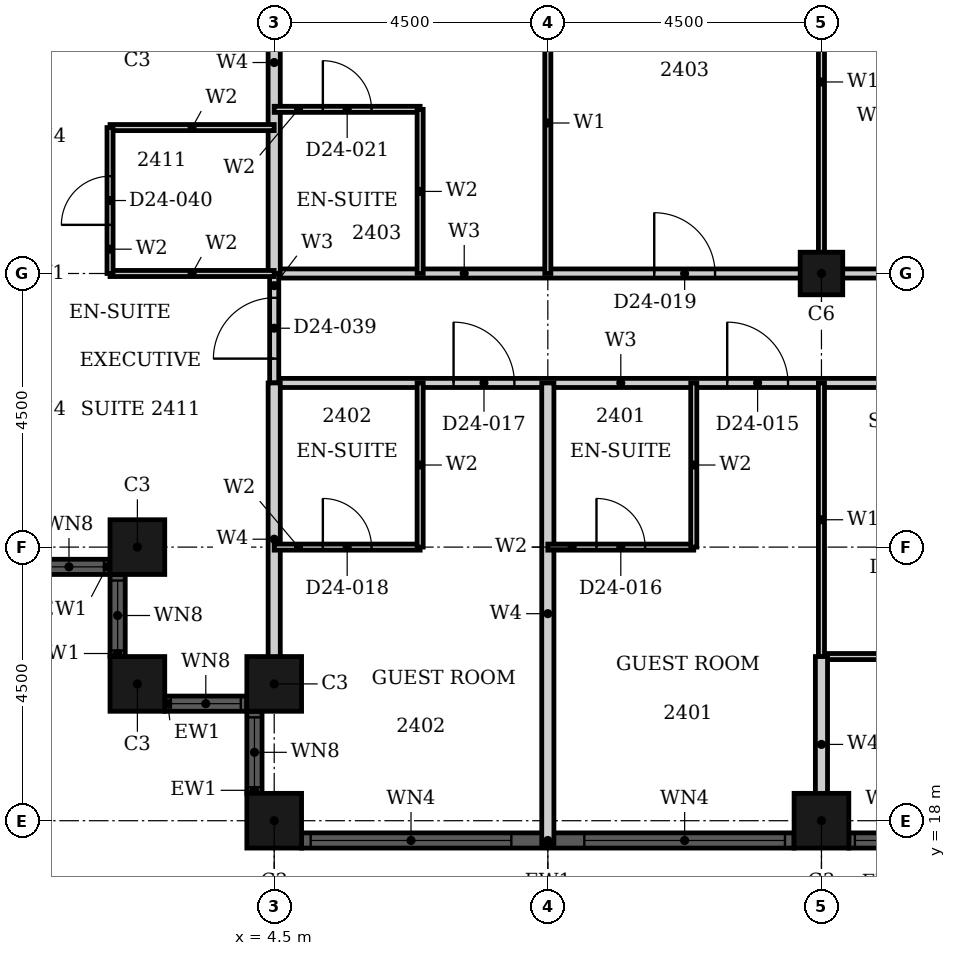
"""IFC4 building model, lengths in metres.
Left out: names, types, materials, properties, quantities, classifications, styles, units other than length and angle.
Written with IfcOpenShell. Run it as: python <this file> out.ifc"""

import sys

from ifc_helpers import new_model, si_unit, direction, frame, frame_2d, origin, origin_2d, place, context, subcontext, project, spatial, rectangle, hollow_rectangle, extrude, element, fill, save


model = new_model("IFC4")
c1 = context("Model", 3, precision=1e-05, world=origin(), true_north=direction((0.0, 1.0)))
c2 = subcontext(c1, "Body", "Model", "MODEL_VIEW")
j1 = project(units=[si_unit("LENGTHUNIT", "METRE"), si_unit("PLANEANGLEUNIT", "RADIAN")], contexts=[c1])
p1 = place(None, origin())
s1 = spatial("IfcSite", under=j1, at=p1, CompositionType="ELEMENT")
p2 = place(p1, origin())
s2 = spatial("IfcBuilding", under=s1, at=p2, CompositionType="ELEMENT")
p3 = place(p2, frame((0.0, 0.0, 100.8)))
s3 = spatial("IfcBuildingStorey", under=s2, at=p3, CompositionType="ELEMENT", Elevation=100.8)
for number, where, z_axis, x_axis in (
    (1, (2.25, 22.5, 0.0), (0.0, 0.0, 1.0), (1.0, 0.0, 0.0)),
    (2, (2.25, 20.25, 0.0), (0.0, 0.0, 1.0), (1.0, 0.0, 0.0)),
    (3, (4.5, 20.25, 0.0), (0.0, 0.0, 1.0), (1.0, 0.0, 0.0)),
    (4, (4.5, 18.0, 0.0), (0.0, 0.0, 1.0), (1.0, 0.0, 0.0)),
    (5, (13.5, 18.0, 0.0), (0.0, 0.0, 1.0), (1.0, 0.0, 0.0)),
):
    element("IfcColumn", number, at=place(p3, frame(where, z_axis=z_axis, x_axis=x_axis)), inside=s3, PredefinedType="COLUMN", context=c2, shape_type="SweptSolid", body=[
        extrude(hollow_rectangle(XDim=0.9, YDim=0.9, WallThickness=0.028, at=origin_2d()), origin(), (0.0, 0.0, 1.0), 3.6),
    ])
p4 = place(p3, frame((13.5, 27.0, 0.0), z_axis=(0.0, 0.0, 1.0), x_axis=(1.0, 0.0, 0.0)))
e6 = element("IfcColumn", 6, at=p4, inside=s3, PredefinedType="COLUMN", context=c2, shape_type="SweptSolid", body=[
    extrude(hollow_rectangle(XDim=0.7, YDim=0.7, WallThickness=0.022, at=origin_2d()), origin(), (0.0, 0.0, 1.0), 3.6),
])
p5 = place(p3, frame((0.45, 22.175, 0.0), z_axis=(0.0, 0.0, 1.0), x_axis=(1.0, 0.0, 0.0)))
e7 = element("IfcWall", 7, at=p5, inside=s3, PredefinedType="SOLIDWALL", context=c2, shape_type="SweptSolid", body=[
    extrude(rectangle(XDim=1.35, YDim=0.25, at=frame_2d((0.675, 0.0))), origin(), (0.0, 0.0, 1.0), 3.6),
])
p6 = place(p5, frame((0.1, 0.0, 0.9)))
e8 = element("IfcOpeningElement", 8, at=p6, cuts=e7, PredefinedType="OPENING", context=c2, shape_type="SweptSolid", body=[
    extrude(rectangle(XDim=1.15, YDim=2.08, at=frame_2d((0.575, 1.04))), frame((0.0, 0.135, 0.0), z_axis=(0.0, -1.0, 0.0), x_axis=(1.0, 0.0, 0.0)), (0.0, 0.0, 1.0), 0.27),
])
p7 = place(p3, frame((1.925, 22.05, 0.0), z_axis=(0.0, 0.0, 1.0), x_axis=(0.0, -1.0, 0.0)))
e9 = element("IfcWall", 9, at=p7, inside=s3, PredefinedType="SOLIDWALL", context=c2, shape_type="SweptSolid", body=[
    extrude(rectangle(XDim=1.35, YDim=0.25, at=frame_2d((0.675, 0.0))), origin(), (0.0, 0.0, 1.0), 3.6),
])
p8 = place(p7, frame((0.1, 0.0, 0.9)))
e10 = element("IfcOpeningElement", 10, at=p8, cuts=e9, PredefinedType="OPENING", context=c2, shape_type="SweptSolid", body=[
    extrude(rectangle(XDim=1.15, YDim=2.08, at=frame_2d((0.575, 1.04))), frame((0.0, 0.135, 0.0), z_axis=(0.0, -1.0, 0.0), x_axis=(1.0, 0.0, 0.0)), (0.0, 0.0, 1.0), 0.27),
])
p9 = place(p3, frame((2.7, 19.925, 0.0), z_axis=(0.0, 0.0, 1.0), x_axis=(1.0, 0.0, 0.0)))
e11 = element("IfcWall", 11, at=p9, inside=s3, PredefinedType="SOLIDWALL", context=c2, shape_type="SweptSolid", body=[
    extrude(rectangle(XDim=1.35, YDim=0.25, at=frame_2d((0.675, 0.0))), origin(), (0.0, 0.0, 1.0), 3.6),
])
p10 = place(p9, frame((0.1, 0.0, 0.9)))
e12 = element("IfcOpeningElement", 12, at=p10, cuts=e11, PredefinedType="OPENING", context=c2, shape_type="SweptSolid", body=[
    extrude(rectangle(XDim=1.15, YDim=2.08, at=frame_2d((0.575, 1.04))), frame((0.0, 0.135, 0.0), z_axis=(0.0, -1.0, 0.0), x_axis=(1.0, 0.0, 0.0)), (0.0, 0.0, 1.0), 0.27),
])
p11 = place(p3, frame((4.175, 19.8, 0.0), z_axis=(0.0, 0.0, 1.0), x_axis=(0.0, -1.0, 0.0)))
e13 = element("IfcWall", 13, at=p11, inside=s3, PredefinedType="SOLIDWALL", context=c2, shape_type="SweptSolid", body=[
    extrude(rectangle(XDim=1.35, YDim=0.25, at=frame_2d((0.675, 0.0))), origin(), (0.0, 0.0, 1.0), 3.6),
])
p12 = place(p11, frame((0.1, 0.0, 0.9)))
e14 = element("IfcOpeningElement", 14, at=p12, cuts=e13, PredefinedType="OPENING", context=c2, shape_type="SweptSolid", body=[
    extrude(rectangle(XDim=1.15, YDim=2.08, at=frame_2d((0.575, 1.04))), frame((0.0, 0.135, 0.0), z_axis=(0.0, -1.0, 0.0), x_axis=(1.0, 0.0, 0.0)), (0.0, 0.0, 1.0), 0.27),
])
p13 = place(p3, frame((4.95, 17.675, 0.0), z_axis=(0.0, 0.0, 1.0), x_axis=(1.0, 0.0, 0.0)))
e15 = element("IfcWall", 15, at=p13, inside=s3, PredefinedType="SOLIDWALL", context=c2, shape_type="SweptSolid", body=[
    extrude(rectangle(XDim=8.1, YDim=0.25, at=frame_2d((4.05, 0.0))), origin(), (0.0, 0.0, 1.0), 3.6),
])
p14 = place(p13, frame((0.15, 0.0, 0.9)))
e16 = element("IfcOpeningElement", 16, at=p14, cuts=e15, PredefinedType="OPENING", context=c2, shape_type="SweptSolid", body=[
    extrude(rectangle(XDim=3.3, YDim=2.08, at=frame_2d((1.65, 1.04))), frame((0.0, 0.135, 0.0), z_axis=(0.0, -1.0, 0.0), x_axis=(1.0, 0.0, 0.0)), (0.0, 0.0, 1.0), 0.27),
])
p15 = place(p13, frame((4.65, 0.0, 0.9)))
e17 = element("IfcOpeningElement", 17, at=p15, cuts=e15, PredefinedType="OPENING", context=c2, shape_type="SweptSolid", body=[
    extrude(rectangle(XDim=3.3, YDim=2.08, at=frame_2d((1.65, 1.04))), frame((0.0, 0.135, 0.0), z_axis=(0.0, -1.0, 0.0), x_axis=(1.0, 0.0, 0.0)), (0.0, 0.0, 1.0), 0.27),
])
p16 = place(p3, frame((13.95, 17.675, 0.0), z_axis=(0.0, 0.0, 1.0), x_axis=(1.0, 0.0, 0.0)))
e18 = element("IfcWall", 18, at=p16, inside=s3, PredefinedType="SOLIDWALL", context=c2, shape_type="SweptSolid", body=[
    extrude(rectangle(XDim=1.35, YDim=0.25, at=frame_2d((0.675, 0.0))), origin(), (0.0, 0.0, 1.0), 3.6),
])
p17 = place(p16, frame((0.1, 0.0, 0.9)))
e19 = element("IfcOpeningElement", 19, at=p17, cuts=e18, PredefinedType="OPENING", context=c2, shape_type="SweptSolid", body=[
    extrude(rectangle(XDim=1.15, YDim=2.08, at=frame_2d((0.575, 1.04))), frame((0.0, 0.135, 0.0), z_axis=(0.0, -1.0, 0.0), x_axis=(1.0, 0.0, 0.0)), (0.0, 0.0, 1.0), 0.27),
])
p18 = place(p3, frame((4.5, 25.2, 0.0), z_axis=(0.0, 0.0, 1.0), x_axis=(1.0, 0.0, 0.0)))
e20 = element("IfcWall", 20, at=p18, inside=s3, PredefinedType="PARTITIONING", context=c2, shape_type="SweptSolid", body=[
    extrude(rectangle(XDim=11.7, YDim=0.15, at=frame_2d((5.85, 0.0))), origin(), (0.0, 0.0, 1.0), 3.3),
])
p19 = place(p18, frame((7.45, 0.0, 0.0)))
e21 = element("IfcOpeningElement", 21, at=p19, cuts=e20, PredefinedType="OPENING", context=c2, shape_type="SweptSolid", body=[
    extrude(rectangle(XDim=1.0, YDim=2.1, at=frame_2d((0.5, 1.05))), frame((0.0, 0.085, 0.0), z_axis=(0.0, -1.0, 0.0), x_axis=(1.0, 0.0, 0.0)), (0.0, 0.0, 1.0), 0.17),
])
p20 = place(p18, frame((2.95, 0.0, 0.0)))
e22 = element("IfcOpeningElement", 22, at=p20, cuts=e20, PredefinedType="OPENING", context=c2, shape_type="SweptSolid", body=[
    extrude(rectangle(XDim=1.0, YDim=2.1, at=frame_2d((0.5, 1.05))), frame((0.0, 0.085, 0.0), z_axis=(0.0, -1.0, 0.0), x_axis=(1.0, 0.0, 0.0)), (0.0, 0.0, 1.0), 0.17),
])
p21 = place(p3, frame((4.5, 27.0, 0.0), z_axis=(0.0, 0.0, 1.0), x_axis=(1.0, 0.0, 0.0)))
e23 = element("IfcWall", 23, at=p21, inside=s3, PredefinedType="PARTITIONING", context=c2, shape_type="SweptSolid", body=[
    extrude(rectangle(XDim=11.7, YDim=0.15, at=frame_2d((5.85, 0.0))), origin(), (0.0, 0.0, 1.0), 2.58),
])
p22 = place(p21, frame((6.25, 0.0, 0.0)))
e24 = element("IfcOpeningElement", 24, at=p22, cuts=e23, PredefinedType="OPENING", context=c2, shape_type="SweptSolid", body=[
    extrude(rectangle(XDim=1.0, YDim=2.1, at=frame_2d((0.5, 1.05))), frame((0.0, 0.085, 0.0), z_axis=(0.0, -1.0, 0.0), x_axis=(1.0, 0.0, 0.0)), (0.0, 0.0, 1.0), 0.17),
])
p23 = place(p3, frame((4.5, 25.2, 0.0), z_axis=(0.0, 0.0, 1.0), x_axis=(0.0, 1.0, 0.0)))
e25 = element("IfcWall", 25, at=p23, inside=s3, PredefinedType="PARTITIONING", context=c2, shape_type="SweptSolid", body=[
    extrude(rectangle(XDim=1.8, YDim=0.15, at=frame_2d((0.9, 0.0))), origin(), (0.0, 0.0, 1.0), 3.3),
])
p24 = place(p23, frame((0.4, 0.0, 0.0)))
e26 = element("IfcOpeningElement", 26, at=p24, cuts=e25, PredefinedType="OPENING", context=c2, shape_type="SweptSolid", body=[
    extrude(rectangle(XDim=1.0, YDim=2.1, at=frame_2d((0.5, 1.05))), frame((0.0, 0.085, 0.0), z_axis=(0.0, -1.0, 0.0), x_axis=(1.0, 0.0, 0.0)), (0.0, 0.0, 1.0), 0.17),
])
p25 = place(p3, frame((13.5, 20.7, 0.0), z_axis=(0.0, 0.0, 1.0), x_axis=(1.0, 0.0, 0.0)))
e27 = element("IfcWall", 27, at=p25, inside=s3, PredefinedType="PARTITIONING", context=c2, shape_type="SweptSolid", body=[
    extrude(rectangle(XDim=2.7, YDim=0.1, at=frame_2d((1.35, 0.0))), origin(), (0.0, 0.0, 1.0), 3.3),
])
p26 = place(p3, frame((13.5, 20.7, 0.0), z_axis=(0.0, 0.0, 1.0), x_axis=(0.0, 1.0, 0.0)))
e28 = element("IfcWall", 28, at=p26, inside=s3, PredefinedType="PARTITIONING", context=c2, shape_type="SweptSolid", body=[
    extrude(rectangle(XDim=4.5, YDim=0.1, at=frame_2d((2.25, 0.0))), origin(), (0.0, 0.0, 1.0), 2.38),
])
p27 = place(p3, frame((13.5, 27.0, 0.0), z_axis=(0.0, 0.0, 1.0), x_axis=(0.0, 1.0, 0.0)))
e29 = element("IfcWall", 29, at=p27, inside=s3, PredefinedType="PARTITIONING", context=c2, shape_type="SweptSolid", body=[
    extrude(rectangle(XDim=6.3, YDim=0.1, at=frame_2d((3.15, 0.0))), origin(), (0.0, 0.0, 1.0), 2.38),
])
p28 = place(p3, frame((9.0, 27.0, 0.0), z_axis=(0.0, 0.0, 1.0), x_axis=(0.0, 1.0, 0.0)))
e30 = element("IfcWall", 30, at=p28, inside=s3, PredefinedType="PARTITIONING", context=c2, shape_type="SweptSolid", body=[
    extrude(rectangle(XDim=9.39, YDim=0.1, at=frame_2d((4.695, 0.0))), origin(), (0.0, 0.0, 1.0), 3.3),
])
p29 = place(p28, frame((4.95, 0.0, 0.0)))
e31 = element("IfcOpeningElement", 31, at=p29, cuts=e30, PredefinedType="OPENING", context=c2, shape_type="SweptSolid", body=[
    extrude(rectangle(XDim=0.9, YDim=2.1, at=frame_2d((0.45, 1.05))), frame((0.0, 0.06, 0.0), z_axis=(0.0, -1.0, 0.0), x_axis=(1.0, 0.0, 0.0)), (0.0, 0.0, 1.0), 0.12),
])
p30 = place(p3, frame((13.5, 17.81, 0.0), z_axis=(0.0, 0.0, 1.0), x_axis=(0.0, 1.0, 0.0)))
e32 = element("IfcWall", 32, at=p30, inside=s3, PredefinedType="PARTITIONING", context=c2, shape_type="SweptSolid", body=[
    extrude(rectangle(XDim=2.89, YDim=0.2, at=frame_2d((1.445, 0.0))), origin(), (0.0, 0.0, 1.0), 2.38),
])
p31 = place(p3, frame((4.5, 20.06, 0.0), z_axis=(0.0, 0.0, 1.0), x_axis=(0.0, 1.0, 0.0)))
e33 = element("IfcWall", 33, at=p31, inside=s3, PredefinedType="PARTITIONING", context=c2, shape_type="SweptSolid", body=[
    extrude(rectangle(XDim=5.14, YDim=0.2, at=frame_2d((2.57, 0.0))), origin(), (0.0, 0.0, 1.0), 3.3),
])
p32 = place(p3, frame((4.5, 27.0, 0.0), z_axis=(0.0, 0.0, 1.0), x_axis=(0.0, 1.0, 0.0)))
e34 = element("IfcWall", 34, at=p32, inside=s3, PredefinedType="PARTITIONING", context=c2, shape_type="SweptSolid", body=[
    extrude(rectangle(XDim=6.94, YDim=0.2, at=frame_2d((3.47, 0.0))), origin(), (0.0, 0.0, 1.0), 3.3),
])
p33 = place(p3, frame((9.0, 17.61, 0.0), z_axis=(0.0, 0.0, 1.0), x_axis=(0.0, 1.0, 0.0)))
e35 = element("IfcWall", 35, at=p33, inside=s3, PredefinedType="PARTITIONING", context=c2, shape_type="SweptSolid", body=[
    extrude(rectangle(XDim=7.59, YDim=0.2, at=frame_2d((3.795, 0.0))), origin(), (0.0, 0.0, 1.0), 3.3),
])
p34 = place(p3, frame((9.0, 22.5, 0.0), z_axis=(0.0, 0.0, 1.0), x_axis=(1.0, 0.0, 0.0)))
e36 = element("IfcWall", 36, at=p34, inside=s3, PredefinedType="PARTITIONING", context=c2, shape_type="SweptSolid", body=[
    extrude(rectangle(XDim=2.4, YDim=0.1, at=frame_2d((1.2, 0.0))), origin(), (0.0, 0.0, 1.0), 2.58),
])
p35 = place(p34, frame((0.8, 0.0, 0.0)))
e37 = element("IfcOpeningElement", 37, at=p35, cuts=e36, PredefinedType="OPENING", context=c2, shape_type="SweptSolid", body=[
    extrude(rectangle(XDim=0.8, YDim=2.1, at=frame_2d((0.4, 1.05))), frame((0.0, 0.06, 0.0), z_axis=(0.0, -1.0, 0.0), x_axis=(1.0, 0.0, 0.0)), (0.0, 0.0, 1.0), 0.12),
])
p36 = place(p3, frame((4.5, 22.5, 0.0), z_axis=(0.0, 0.0, 1.0), x_axis=(1.0, 0.0, 0.0)))
e38 = element("IfcWall", 38, at=p36, inside=s3, PredefinedType="PARTITIONING", context=c2, shape_type="SweptSolid", body=[
    extrude(rectangle(XDim=2.4, YDim=0.1, at=frame_2d((1.2, 0.0))), origin(), (0.0, 0.0, 1.0), 2.58),
])
p37 = place(p36, frame((0.8, 0.0, 0.0)))
e39 = element("IfcOpeningElement", 39, at=p37, cuts=e38, PredefinedType="OPENING", context=c2, shape_type="SweptSolid", body=[
    extrude(rectangle(XDim=0.8, YDim=2.1, at=frame_2d((0.4, 1.05))), frame((0.0, 0.06, 0.0), z_axis=(0.0, -1.0, 0.0), x_axis=(1.0, 0.0, 0.0)), (0.0, 0.0, 1.0), 0.12),
])
p38 = place(p3, frame((1.8, 27.0, 0.0), z_axis=(0.0, 0.0, 1.0), x_axis=(1.0, 0.0, 0.0)))
e40 = element("IfcWall", 40, at=p38, inside=s3, PredefinedType="PARTITIONING", context=c2, shape_type="SweptSolid", body=[
    extrude(rectangle(XDim=2.7, YDim=0.1, at=frame_2d((1.35, 0.0))), origin(), (0.0, 0.0, 1.0), 2.58),
])
p39 = place(p3, frame((1.8, 29.4, 0.0), z_axis=(0.0, 0.0, 1.0), x_axis=(1.0, 0.0, 0.0)))
e41 = element("IfcWall", 41, at=p39, inside=s3, PredefinedType="PARTITIONING", context=c2, shape_type="SweptSolid", body=[
    extrude(rectangle(XDim=2.7, YDim=0.1, at=frame_2d((1.35, 0.0))), origin(), (0.0, 0.0, 1.0), 3.3),
])
p40 = place(p3, frame((4.5, 29.7, 0.0), z_axis=(0.0, 0.0, 1.0), x_axis=(1.0, 0.0, 0.0)))
e42 = element("IfcWall", 42, at=p40, inside=s3, PredefinedType="PARTITIONING", context=c2, shape_type="SweptSolid", body=[
    extrude(rectangle(XDim=2.4, YDim=0.1, at=frame_2d((1.2, 0.0))), origin(), (0.0, 0.0, 1.0), 3.3),
])
p41 = place(p40, frame((0.8, 0.0, 0.0)))
e43 = element("IfcOpeningElement", 43, at=p41, cuts=e42, PredefinedType="OPENING", context=c2, shape_type="SweptSolid", body=[
    extrude(rectangle(XDim=0.8, YDim=2.1, at=frame_2d((0.4, 1.05))), frame((0.0, 0.06, 0.0), z_axis=(0.0, -1.0, 0.0), x_axis=(1.0, 0.0, 0.0)), (0.0, 0.0, 1.0), 0.12),
])
p42 = place(p3, frame((1.8, 27.0, 0.0), z_axis=(0.0, 0.0, 1.0), x_axis=(0.0, 1.0, 0.0)))
e44 = element("IfcWall", 44, at=p42, inside=s3, PredefinedType="PARTITIONING", context=c2, shape_type="SweptSolid", body=[
    extrude(rectangle(XDim=2.4, YDim=0.1, at=frame_2d((1.2, 0.0))), origin(), (0.0, 0.0, 1.0), 3.3),
])
p43 = place(p42, frame((0.8, 0.0, 0.0)))
e45 = element("IfcOpeningElement", 45, at=p43, cuts=e44, PredefinedType="OPENING", context=c2, shape_type="SweptSolid", body=[
    extrude(rectangle(XDim=0.8, YDim=2.1, at=frame_2d((0.4, 1.05))), frame((0.0, 0.06, 0.0), z_axis=(0.0, -1.0, 0.0), x_axis=(1.0, 0.0, 0.0)), (0.0, 0.0, 1.0), 0.12),
])
for number, where, z_axis, x_axis in (
    (46, (11.4, 22.5, 0.0), (0.0, 0.0, 1.0), (0.0, 1.0, 0.0)),
    (47, (6.9, 22.5, 0.0), (0.0, 0.0, 1.0), (0.0, 1.0, 0.0)),
    (48, (6.9, 27.0, 0.0), (0.0, 0.0, 1.0), (0.0, 1.0, 0.0)),
):
    element("IfcWall", number, at=place(p3, frame(where, z_axis=z_axis, x_axis=x_axis)), inside=s3, PredefinedType="PARTITIONING", context=c2, shape_type="SweptSolid", body=[
        extrude(rectangle(XDim=2.7, YDim=0.1, at=frame_2d((1.35, 0.0))), origin(), (0.0, 0.0, 1.0), 3.3),
    ])
p44 = place(p6, origin())
e49 = element("IfcWindow", 49, at=p44, inside=s3, PartitioningType="SINGLE_PANEL", PredefinedType="WINDOW", context=c2, shape_type="SweptSolid", body=[
    extrude(rectangle(XDim=1.15, YDim=2.08, at=frame_2d((0.575, 1.04))), frame((0.0, 0.03, 0.0), z_axis=(0.0, -1.0, 0.0), x_axis=(1.0, 0.0, 0.0)), (0.0, 0.0, 1.0), 0.06),
])
fill(e8, e49)
p45 = place(p8, origin())
e50 = element("IfcWindow", 50, at=p45, inside=s3, PartitioningType="SINGLE_PANEL", PredefinedType="WINDOW", context=c2, shape_type="SweptSolid", body=[
    extrude(rectangle(XDim=1.15, YDim=2.08, at=frame_2d((0.575, 1.04))), frame((0.0, 0.03, 0.0), z_axis=(0.0, -1.0, 0.0), x_axis=(1.0, 0.0, 0.0)), (0.0, 0.0, 1.0), 0.06),
])
fill(e10, e50)
p46 = place(p10, origin())
e51 = element("IfcWindow", 51, at=p46, inside=s3, PartitioningType="SINGLE_PANEL", PredefinedType="WINDOW", context=c2, shape_type="SweptSolid", body=[
    extrude(rectangle(XDim=1.15, YDim=2.08, at=frame_2d((0.575, 1.04))), frame((0.0, 0.03, 0.0), z_axis=(0.0, -1.0, 0.0), x_axis=(1.0, 0.0, 0.0)), (0.0, 0.0, 1.0), 0.06),
])
fill(e12, e51)
p47 = place(p12, origin())
e52 = element("IfcWindow", 52, at=p47, inside=s3, PartitioningType="SINGLE_PANEL", PredefinedType="WINDOW", context=c2, shape_type="SweptSolid", body=[
    extrude(rectangle(XDim=1.15, YDim=2.08, at=frame_2d((0.575, 1.04))), frame((0.0, 0.03, 0.0), z_axis=(0.0, -1.0, 0.0), x_axis=(1.0, 0.0, 0.0)), (0.0, 0.0, 1.0), 0.06),
])
fill(e14, e52)
p48 = place(p14, origin())
e53 = element("IfcWindow", 53, at=p48, inside=s3, PartitioningType="SINGLE_PANEL", PredefinedType="WINDOW", context=c2, shape_type="SweptSolid", body=[
    extrude(rectangle(XDim=3.3, YDim=2.08, at=frame_2d((1.65, 1.04))), frame((0.0, 0.03, 0.0), z_axis=(0.0, -1.0, 0.0), x_axis=(1.0, 0.0, 0.0)), (0.0, 0.0, 1.0), 0.06),
])
fill(e16, e53)
p49 = place(p15, origin())
e54 = element("IfcWindow", 54, at=p49, inside=s3, PartitioningType="SINGLE_PANEL", PredefinedType="WINDOW", context=c2, shape_type="SweptSolid", body=[
    extrude(rectangle(XDim=3.3, YDim=2.08, at=frame_2d((1.65, 1.04))), frame((0.0, 0.03, 0.0), z_axis=(0.0, -1.0, 0.0), x_axis=(1.0, 0.0, 0.0)), (0.0, 0.0, 1.0), 0.06),
])
fill(e17, e54)
p50 = place(p17, origin())
e55 = element("IfcWindow", 55, at=p50, inside=s3, PartitioningType="SINGLE_PANEL", PredefinedType="WINDOW", context=c2, shape_type="SweptSolid", body=[
    extrude(rectangle(XDim=1.15, YDim=2.08, at=frame_2d((0.575, 1.04))), frame((0.0, 0.03, 0.0), z_axis=(0.0, -1.0, 0.0), x_axis=(1.0, 0.0, 0.0)), (0.0, 0.0, 1.0), 0.06),
])
fill(e19, e55)
p51 = place(p19, origin())
e56 = element("IfcDoor", 56, at=p51, inside=s3, OperationType="SINGLE_SWING_RIGHT", PredefinedType="DOOR", context=c2, shape_type="SweptSolid", body=[
    extrude(rectangle(XDim=1.0, YDim=2.1, at=frame_2d((0.5, 1.05))), frame((0.0, 0.025, 0.0), z_axis=(0.0, -1.0, 0.0), x_axis=(1.0, 0.0, 0.0)), (0.0, 0.0, 1.0), 0.05),
])
fill(e21, e56)
p52 = place(p35, origin())
e57 = element("IfcDoor", 57, at=p52, inside=s3, OperationType="SINGLE_SWING_LEFT", PredefinedType="DOOR", context=c2, shape_type="SweptSolid", body=[
    extrude(rectangle(XDim=0.8, YDim=2.1, at=frame_2d((0.4, 1.05))), frame((0.0, 0.025, 0.0), z_axis=(0.0, -1.0, 0.0), x_axis=(1.0, 0.0, 0.0)), (0.0, 0.0, 1.0), 0.05),
])
fill(e37, e57)
p53 = place(p20, origin())
e58 = element("IfcDoor", 58, at=p53, inside=s3, OperationType="SINGLE_SWING_RIGHT", PredefinedType="DOOR", context=c2, shape_type="SweptSolid", body=[
    extrude(rectangle(XDim=1.0, YDim=2.1, at=frame_2d((0.5, 1.05))), frame((0.0, 0.025, 0.0), z_axis=(0.0, -1.0, 0.0), x_axis=(1.0, 0.0, 0.0)), (0.0, 0.0, 1.0), 0.05),
])
fill(e22, e58)
p54 = place(p37, origin())
e59 = element("IfcDoor", 59, at=p54, inside=s3, OperationType="SINGLE_SWING_RIGHT", PredefinedType="DOOR", context=c2, shape_type="SweptSolid", body=[
    extrude(rectangle(XDim=0.8, YDim=2.1, at=frame_2d((0.4, 1.05))), frame((0.0, 0.025, 0.0), z_axis=(0.0, -1.0, 0.0), x_axis=(1.0, 0.0, 0.0)), (0.0, 0.0, 1.0), 0.05),
])
fill(e39, e59)
p55 = place(p22, origin())
e60 = element("IfcDoor", 60, at=p55, inside=s3, OperationType="SINGLE_SWING_LEFT", PredefinedType="DOOR", context=c2, shape_type="SweptSolid", body=[
    extrude(rectangle(XDim=1.0, YDim=2.1, at=frame_2d((0.5, 1.05))), frame((0.0, 0.025, 0.0), z_axis=(0.0, -1.0, 0.0), x_axis=(1.0, 0.0, 0.0)), (0.0, 0.0, 1.0), 0.05),
])
fill(e24, e60)
p56 = place(p41, origin())
e61 = element("IfcDoor", 61, at=p56, inside=s3, OperationType="SINGLE_SWING_LEFT", PredefinedType="DOOR", context=c2, shape_type="SweptSolid", body=[
    extrude(rectangle(XDim=0.8, YDim=2.1, at=frame_2d((0.4, 1.05))), frame((0.0, 0.025, 0.0), z_axis=(0.0, -1.0, 0.0), x_axis=(1.0, 0.0, 0.0)), (0.0, 0.0, 1.0), 0.05),
])
fill(e43, e61)
p57 = place(p24, origin())
e62 = element("IfcDoor", 62, at=p57, inside=s3, OperationType="SINGLE_SWING_LEFT", PredefinedType="DOOR", context=c2, shape_type="SweptSolid", body=[
    extrude(rectangle(XDim=1.0, YDim=2.1, at=frame_2d((0.5, 1.05))), frame((0.0, 0.025, 0.0), z_axis=(0.0, -1.0, 0.0), x_axis=(1.0, 0.0, 0.0)), (0.0, 0.0, 1.0), 0.05),
])
fill(e26, e62)
p58 = place(p43, origin())
e63 = element("IfcDoor", 63, at=p58, inside=s3, OperationType="SINGLE_SWING_RIGHT", PredefinedType="DOOR", context=c2, shape_type="SweptSolid", body=[
    extrude(rectangle(XDim=0.8, YDim=2.1, at=frame_2d((0.4, 1.05))), frame((0.0, 0.025, 0.0), z_axis=(0.0, -1.0, 0.0), x_axis=(1.0, 0.0, 0.0)), (0.0, 0.0, 1.0), 0.05),
])
fill(e45, e63)
save(model, sys.argv[1])
